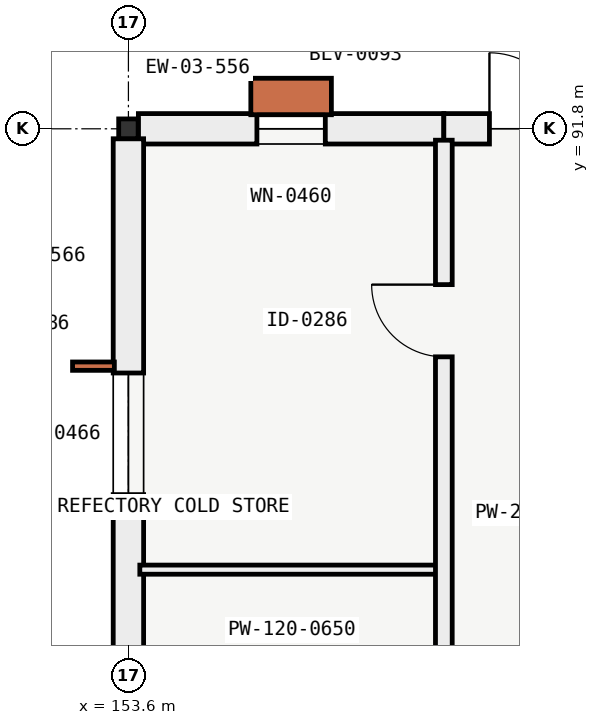
"""IFC4 building model, lengths in metres.
Left out: names, types, materials, properties, quantities, classifications, styles, units other than length and angle.
Written with IfcOpenShell. Run it as: python <this file> out.ifc"""

import sys

from ifc_helpers import new_model, si_unit, direction, frame, frame_2d, origin, origin_2d, place, context, subcontext, project, spatial, rectangle, i_section, extrude, element, fill, save


model = new_model("IFC4")
c1 = context("Model", 3, precision=1e-05, world=origin(), true_north=direction((0.0, 1.0)))
c2 = subcontext(c1, "Body", "Model", "MODEL_VIEW")
j1 = project(units=[si_unit("LENGTHUNIT", "METRE"), si_unit("PLANEANGLEUNIT", "RADIAN")], contexts=[c1])
p1 = place(None, origin())
s1 = spatial("IfcSite", under=j1, at=p1, CompositionType="ELEMENT")
p2 = place(p1, origin())
s2 = spatial("IfcBuilding", under=s1, at=p2, CompositionType="ELEMENT")
p3 = place(p2, origin())
s3 = spatial("IfcBuildingStorey", under=s2, at=p3, CompositionType="ELEMENT", Elevation=0.0)
p4 = place(p3, frame((153.6, 91.8, -0.4), z_axis=(0.0, 0.0, 1.0), x_axis=(1.0, 0.0, 0.0)))
e1 = element("IfcColumn", 1, at=p4, inside=s3, PredefinedType="COLUMN", context=c2, shape_type="SweptSolid", body=[
    extrude(i_section(OverallWidth=0.256, OverallDepth=0.26, WebThickness=0.01, FlangeThickness=0.017, FilletRadius=0.014, at=origin_2d()), origin(), (0.0, 0.0, 1.0), 5.8),
])
p5 = place(p3, frame((153.731, 91.8, 0.0), z_axis=(0.0, 0.0, 1.0), x_axis=(1.0, 0.0, 0.0)))
e2 = element("IfcWall", 2, at=p5, inside=s3, PredefinedType="SOLIDWALL", context=c2, shape_type="SweptSolid", body=[
    extrude(rectangle(XDim=4.019, YDim=0.4, at=frame_2d((2.01, 0.0))), origin(), (0.0, 0.0, 1.0), 4.64),
])
p6 = place(p5, frame((1.56, 0.0, 0.85)))
e3 = element("IfcOpeningElement", 3, at=p6, cuts=e2, PredefinedType="OPENING", context=c2, shape_type="SweptSolid", body=[
    extrude(rectangle(XDim=0.9, YDim=2.2, at=frame_2d((0.45, 1.1))), frame((0.0, 0.21, 0.0), z_axis=(0.0, -1.0, 0.0), x_axis=(1.0, 0.0, 0.0)), (0.0, 0.0, 1.0), 0.42),
])
p7 = place(p3, frame((157.75, 91.8, 0.0), z_axis=(0.0, 0.0, 1.0), x_axis=(1.0, 0.0, 0.0)))
e4 = element("IfcWall", 4, at=p7, inside=s3, PredefinedType="SOLIDWALL", context=c2, shape_type="SweptSolid", body=[
    extrude(rectangle(XDim=3.2, YDim=0.4, at=frame_2d((1.6, 0.0))), origin(), (0.0, 0.0, 1.0), 4.64),
])
p8 = place(p7, frame((0.6, 0.0, 0.0)))
e5 = element("IfcOpeningElement", 5, at=p8, cuts=e4, PredefinedType="OPENING", context=c2, shape_type="SweptSolid", body=[
    extrude(rectangle(XDim=2.0, YDim=2.4, at=frame_2d((1.0, 1.2))), frame((0.0, 0.21, 0.0), z_axis=(0.0, -1.0, 0.0), x_axis=(1.0, 0.0, 0.0)), (0.0, 0.0, 1.0), 0.42),
])
p9 = place(p3, frame((153.6, 83.906, 0.0), z_axis=(0.0, 0.0, 1.0), x_axis=(0.0, 1.0, 0.0)))
e6 = element("IfcWall", 6, at=p9, inside=s3, PredefinedType="SOLIDWALL", context=c2, shape_type="SweptSolid", body=[
    extrude(rectangle(XDim=7.763, YDim=0.4, at=frame_2d((3.882, 0.0))), origin(), (0.0, 0.0, 1.0), 4.694),
])
p10 = place(p9, frame((3.082, 0.0, 0.9)))
e7 = element("IfcOpeningElement", 7, at=p10, cuts=e6, PredefinedType="OPENING", context=c2, shape_type="SweptSolid", body=[
    extrude(rectangle(XDim=1.6, YDim=1.9, at=frame_2d((0.8, 0.95))), frame((0.0, 0.21, 0.0), z_axis=(0.0, -1.0, 0.0), x_axis=(1.0, 0.0, 0.0)), (0.0, 0.0, 1.0), 0.42),
])
p11 = place(p3, frame((153.75, 86.0, 0.0), z_axis=(0.0, 0.0, 1.0), x_axis=(1.0, 0.0, 0.0)))
e8 = element("IfcWall", 8, at=p11, inside=s3, PredefinedType="PARTITIONING", context=c2, shape_type="SweptSolid", body=[
    extrude(rectangle(XDim=4.0, YDim=0.12, at=frame_2d((2.0, 0.0))), origin(), (0.0, 0.0, 1.0), 5.05),
])
p12 = place(p3, frame((157.75, 81.6, 0.0), z_axis=(0.0, 0.0, 1.0), x_axis=(0.0, 1.0, 0.0)))
e9 = element("IfcWall", 9, at=p12, inside=s3, PredefinedType="PARTITIONING", context=c2, shape_type="SweptSolid", body=[
    extrude(rectangle(XDim=10.05, YDim=0.22, at=frame_2d((5.025, 0.0))), origin(), (0.0, 0.0, 1.0), 4.64),
])
p13 = place(p12, frame((2.2, 0.0, 0.0)))
e10 = element("IfcOpeningElement", 10, at=p13, cuts=e9, PredefinedType="OPENING", context=c2, shape_type="SweptSolid", body=[
    extrude(rectangle(XDim=0.9, YDim=2.05, at=frame_2d((0.45, 1.025))), frame((0.0, 0.12, 0.0), z_axis=(0.0, -1.0, 0.0), x_axis=(1.0, 0.0, 0.0)), (0.0, 0.0, 1.0), 0.24),
])
p14 = place(p12, frame((7.2, 0.0, 0.0)))
e11 = element("IfcOpeningElement", 11, at=p14, cuts=e9, PredefinedType="OPENING", context=c2, shape_type="SweptSolid", body=[
    extrude(rectangle(XDim=0.95, YDim=2.1, at=frame_2d((0.475, 1.05))), frame((0.0, 0.12, 0.0), z_axis=(0.0, -1.0, 0.0), x_axis=(1.0, 0.0, 0.0)), (0.0, 0.0, 1.0), 0.24),
])
p15 = place(p6, origin())
e12 = element("IfcWindow", 12, at=p15, inside=s3, PartitioningType="SINGLE_PANEL", PredefinedType="WINDOW", context=c2, shape_type="SweptSolid", body=[
    extrude(rectangle(XDim=0.9, YDim=2.2, at=frame_2d((0.45, 1.1))), frame((0.0, 0.03, 0.0), z_axis=(0.0, -1.0, 0.0), x_axis=(1.0, 0.0, 0.0)), (0.0, 0.0, 1.0), 0.06),
])
fill(e3, e12)
p16 = place(p8, origin())
e13 = element("IfcDoor", 13, at=p16, inside=s3, OperationType="DOUBLE_DOOR_SINGLE_SWING", PredefinedType="DOOR", context=c2, shape_type="SweptSolid", body=[
    extrude(rectangle(XDim=2.0, YDim=2.4, at=frame_2d((1.0, 1.2))), frame((0.0, 0.025, 0.0), z_axis=(0.0, -1.0, 0.0), x_axis=(1.0, 0.0, 0.0)), (0.0, 0.0, 1.0), 0.05),
])
fill(e5, e13)
p17 = place(p10, origin())
e14 = element("IfcWindow", 14, at=p17, inside=s3, PartitioningType="SINGLE_PANEL", PredefinedType="WINDOW", context=c2, shape_type="SweptSolid", body=[
    extrude(rectangle(XDim=1.6, YDim=1.9, at=frame_2d((0.8, 0.95))), frame((0.0, 0.03, 0.0), z_axis=(0.0, -1.0, 0.0), x_axis=(1.0, 0.0, 0.0)), (0.0, 0.0, 1.0), 0.06),
])
fill(e7, e14)
p18 = place(p14, origin())
e15 = element("IfcDoor", 15, at=p18, inside=s3, OperationType="SINGLE_SWING_RIGHT", PredefinedType="DOOR", context=c2, shape_type="SweptSolid", body=[
    extrude(rectangle(XDim=0.95, YDim=2.1, at=frame_2d((0.475, 1.05))), frame((0.0, 0.025, 0.0), z_axis=(0.0, -1.0, 0.0), x_axis=(1.0, 0.0, 0.0)), (0.0, 0.0, 1.0), 0.05),
])
fill(e11, e15)
save(model, sys.argv[1])
